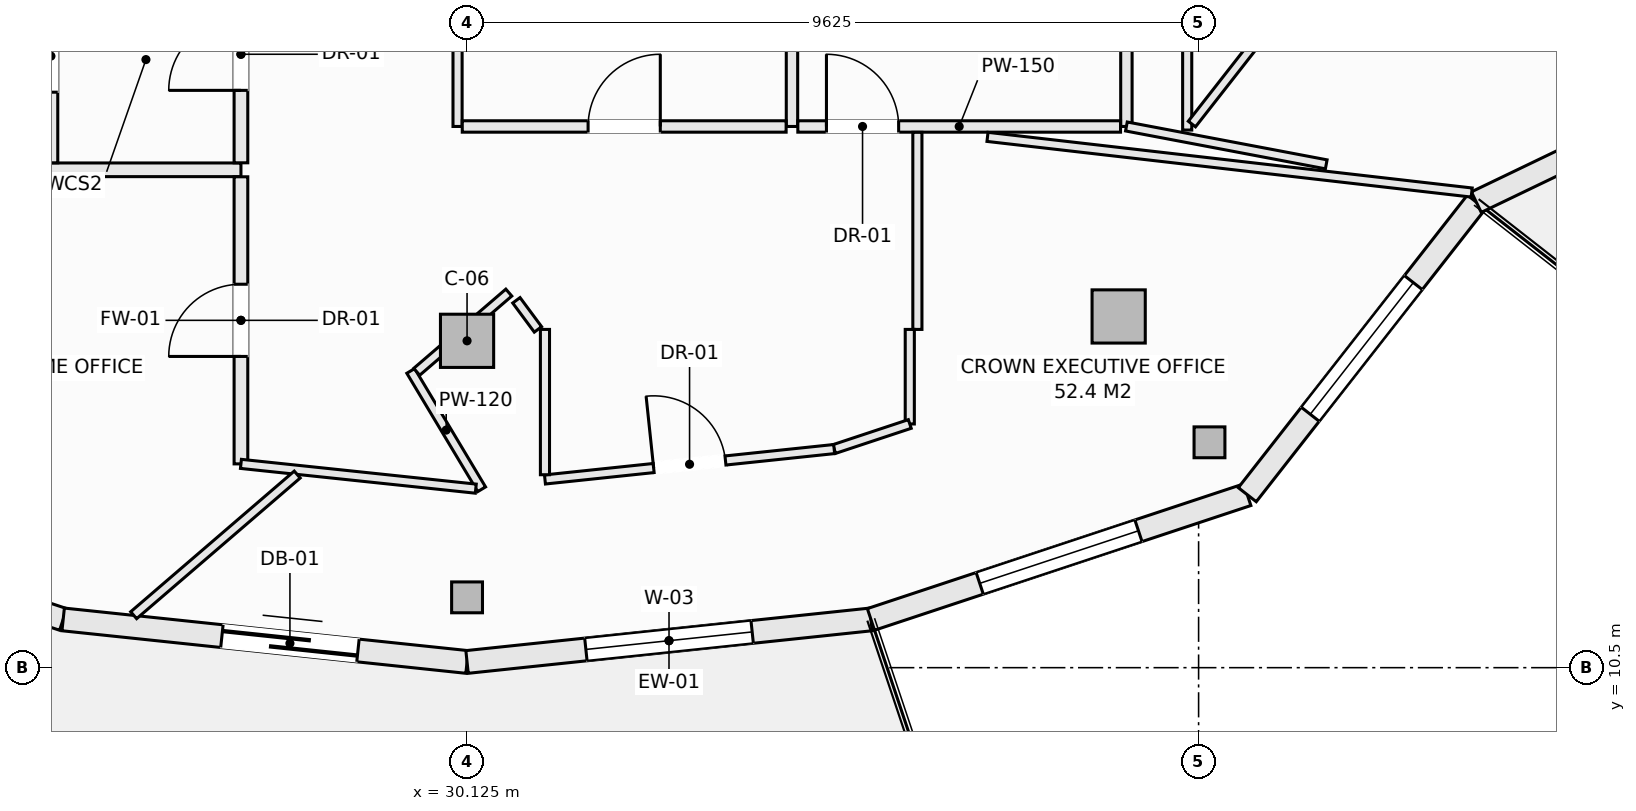
"""IFC4 building model, lengths in metres.
Left out: names, types, materials, properties, quantities, classifications, styles, units other than length and angle.
Written with IfcOpenShell. Run it as: python <this file> out.ifc"""

import sys

from ifc_helpers import new_model, si_unit, direction, frame, frame_2d, origin, origin_2d, place, context, subcontext, project, spatial, rectangle, hollow_rectangle, extrude, element, fill, save


model = new_model("IFC4")
c1 = context("Model", 3, precision=1e-05, world=origin(), true_north=direction((0.0, 1.0)))
c2 = subcontext(c1, "Body", "Model", "MODEL_VIEW")
j1 = project(units=[si_unit("LENGTHUNIT", "METRE"), si_unit("PLANEANGLEUNIT", "RADIAN")], contexts=[c1])
p1 = place(None, origin())
s1 = spatial("IfcSite", under=j1, at=p1, CompositionType="ELEMENT")
p2 = place(p1, origin())
s2 = spatial("IfcBuilding", under=s1, at=p2, CompositionType="ELEMENT")
p3 = place(p2, frame((0.0, 0.0, 262.4)))
s3 = spatial("IfcBuildingStorey", under=s2, at=p3, CompositionType="ELEMENT", Elevation=262.4)
for number, where, z_axis, x_axis in (
    (1, (30.125, 11.425, -0.27), (0.0, 0.0, 1.0), (1.0, 0.0, 0.0)),
    (2, (39.893, 13.465, -0.27), (0.0, 0.0, 1.0), (1.0, 0.0, 0.0)),
):
    element("IfcColumn", number, at=place(p3, frame(where, z_axis=z_axis, x_axis=x_axis)), inside=s3, PredefinedType="COLUMN", context=c2, shape_type="SweptSolid", body=[
        extrude(hollow_rectangle(XDim=0.406, YDim=0.406, WallThickness=0.016, at=origin_2d()), origin(), (0.0, 0.0, 1.0), 3.3),
    ])
for number, where, z_axis, x_axis in (
    (3, (30.125, 14.8, -0.27), (0.0, 0.0, 1.0), (1.0, 0.0, 0.0)),
    (4, (38.698, 15.121, -0.27), (0.0, 0.0, 1.0), (1.0, 0.0, 0.0)),
):
    element("IfcColumn", number, at=place(p3, frame(where, z_axis=z_axis, x_axis=x_axis)), inside=s3, PredefinedType="COLUMN", context=c2, shape_type="SweptSolid", body=[
        extrude(rectangle(XDim=0.7, YDim=0.7, at=origin_2d()), origin(), (0.0, 0.0, 1.0), 3.3),
    ])
p4 = place(p3, frame((19.859, 12.775, 0.0), z_axis=(0.0, 0.0, 1.0), x_axis=(0.949252744709, -0.314514271001, 0.0)))
e5 = element("IfcWall", 5, at=p4, inside=s3, PredefinedType="SOLIDWALL", context=c2, shape_type="SweptSolid", body=[
    extrude(rectangle(XDim=5.216, YDim=0.3, at=frame_2d((2.608, 0.0))), origin(), (0.0, 0.0, 1.0), 2.605),
])
p5 = place(p4, frame((1.508, 0.0, 0.72)))
e6 = element("IfcOpeningElement", 6, at=p5, cuts=e5, PredefinedType="OPENING", context=c2, shape_type="SweptSolid", body=[
    extrude(rectangle(XDim=2.2, YDim=1.65, at=frame_2d((1.1, 0.825))), frame((0.0, 0.16, 0.0), z_axis=(0.0, -1.0, 0.0), x_axis=(1.0, 0.0, 0.0)), (0.0, 0.0, 1.0), 0.32),
])
p6 = place(p3, frame((24.811, 11.135, 0.0), z_axis=(0.0, 0.0, 1.0), x_axis=(0.9944966869, -0.104768028258, 0.0)))
e7 = element("IfcWall", 7, at=p6, inside=s3, PredefinedType="SOLIDWALL", context=c2, shape_type="SweptSolid", body=[
    extrude(rectangle(XDim=5.343, YDim=0.3, at=frame_2d((2.672, 0.0))), origin(), (0.0, 0.0, 1.0), 2.605),
])
p7 = place(p6, frame((2.1, 0.0, 0.0)))
e8 = element("IfcOpeningElement", 8, at=p7, cuts=e7, PredefinedType="OPENING", context=c2, shape_type="SweptSolid", body=[
    extrude(rectangle(XDim=1.8, YDim=2.25, at=frame_2d((0.9, 1.125))), frame((0.0, 0.16, 0.0), z_axis=(0.0, -1.0, 0.0), x_axis=(1.0, 0.0, 0.0)), (0.0, 0.0, 1.0), 0.32),
])
p8 = place(p3, frame((30.125, 10.575, 0.0), z_axis=(0.0, 0.0, 1.0), x_axis=(0.9944966869, 0.104768028258, 0.0)))
e9 = element("IfcWall", 9, at=p8, inside=s3, PredefinedType="SOLIDWALL", context=c2, shape_type="SweptSolid", body=[
    extrude(rectangle(XDim=5.343, YDim=0.3, at=frame_2d((2.672, 0.0))), origin(), (0.0, 0.0, 1.0), 2.605),
])
p9 = place(p8, frame((1.572, 0.0, 0.72)))
e10 = element("IfcOpeningElement", 10, at=p9, cuts=e9, PredefinedType="OPENING", context=c2, shape_type="SweptSolid", body=[
    extrude(rectangle(XDim=2.2, YDim=1.65, at=frame_2d((1.1, 0.825))), frame((0.0, 0.16, 0.0), z_axis=(0.0, -1.0, 0.0), x_axis=(1.0, 0.0, 0.0)), (0.0, 0.0, 1.0), 0.32),
])
p10 = place(p3, frame((35.439, 11.135, 0.0), z_axis=(0.0, 0.0, 1.0), x_axis=(0.949252744709, 0.314514271001, 0.0)))
e11 = element("IfcWall", 11, at=p10, inside=s3, PredefinedType="SOLIDWALL", context=c2, shape_type="SweptSolid", body=[
    extrude(rectangle(XDim=5.216, YDim=0.3, at=frame_2d((2.608, 0.0))), origin(), (0.0, 0.0, 1.0), 2.605),
])
p11 = place(p10, frame((1.508, 0.0, 0.72)))
e12 = element("IfcOpeningElement", 12, at=p11, cuts=e11, PredefinedType="OPENING", context=c2, shape_type="SweptSolid", body=[
    extrude(rectangle(XDim=2.2, YDim=1.65, at=frame_2d((1.1, 0.825))), frame((0.0, 0.16, 0.0), z_axis=(0.0, -1.0, 0.0), x_axis=(1.0, 0.0, 0.0)), (0.0, 0.0, 1.0), 0.32),
])
p12 = place(p3, frame((40.391, 12.775, 0.0), z_axis=(0.0, 0.0, 1.0), x_axis=(0.616413297421, 0.78742278781, 0.0)))
e13 = element("IfcWall", 13, at=p12, inside=s3, PredefinedType="SOLIDWALL", context=c2, shape_type="SweptSolid", body=[
    extrude(rectangle(XDim=4.888, YDim=0.3, at=frame_2d((2.444, 0.0))), origin(), (0.0, 0.0, 1.0), 2.605),
])
p13 = place(p12, frame((1.344, 0.0, 0.72)))
e14 = element("IfcOpeningElement", 14, at=p13, cuts=e13, PredefinedType="OPENING", context=c2, shape_type="SweptSolid", body=[
    extrude(rectangle(XDim=2.2, YDim=1.65, at=frame_2d((1.1, 0.825))), frame((0.0, 0.16, 0.0), z_axis=(0.0, -1.0, 0.0), x_axis=(1.0, 0.0, 0.0)), (0.0, 0.0, 1.0), 0.32),
])
p14 = place(p3, frame((43.404, 16.625, 0.0), z_axis=(0.0, 0.0, 1.0), x_axis=(0.901346013132, 0.433099716706, 0.0)))
e15 = element("IfcWall", 15, at=p14, inside=s3, PredefinedType="SOLIDWALL", context=c2, shape_type="SweptSolid", body=[
    extrude(rectangle(XDim=4.994, YDim=0.3, at=frame_2d((2.497, 0.0))), origin(), (0.0, 0.0, 1.0), 2.605),
])
p15 = place(p14, frame((1.397, 0.0, 0.72)))
e16 = element("IfcOpeningElement", 16, at=p15, cuts=e15, PredefinedType="OPENING", context=c2, shape_type="SweptSolid", body=[
    extrude(rectangle(XDim=2.2, YDim=1.65, at=frame_2d((1.1, 0.825))), frame((0.0, 0.16, 0.0), z_axis=(0.0, -1.0, 0.0), x_axis=(1.0, 0.0, 0.0)), (0.0, 0.0, 1.0), 0.32),
])
p16 = place(p3, frame((22.15, 17.05, 0.0), z_axis=(0.0, 0.0, 1.0), x_axis=(1.0, 0.0, 0.0)))
e17 = element("IfcWall", 17, at=p16, inside=s3, PredefinedType="SOLIDWALL", context=c2, shape_type="SweptSolid", body=[
    extrude(rectangle(XDim=5.0, YDim=0.18, at=frame_2d((2.5, 0.0))), origin(), (0.0, 0.0, 1.0), 3.03),
])
p17 = place(p3, frame((24.65, 17.142, 0.0), z_axis=(0.0, 0.0, 1.0), x_axis=(0.0, 1.0, 0.0)))
e18 = element("IfcWall", 18, at=p17, inside=s3, PredefinedType="SOLIDWALL", context=c2, shape_type="SweptSolid", body=[
    extrude(rectangle(XDim=2.808, YDim=0.18, at=frame_2d((1.404, 0.0))), origin(), (0.0, 0.0, 1.0), 3.03),
])
p18 = place(p17, frame((0.929, 0.0, 0.0)))
e19 = element("IfcOpeningElement", 19, at=p18, cuts=e18, PredefinedType="OPENING", context=c2, shape_type="SweptSolid", body=[
    extrude(rectangle(XDim=0.95, YDim=2.1, at=frame_2d((0.475, 1.05))), frame((0.0, 0.1, 0.0), z_axis=(0.0, -1.0, 0.0), x_axis=(1.0, 0.0, 0.0)), (0.0, 0.0, 1.0), 0.2),
])
p19 = place(p3, frame((27.15, 13.181, 0.0), z_axis=(0.0, 0.0, 1.0), x_axis=(0.0, 1.0, 0.0)))
e20 = element("IfcWall", 20, at=p19, inside=s3, PredefinedType="SOLIDWALL", context=c2, shape_type="SweptSolid", body=[
    extrude(rectangle(XDim=3.777, YDim=0.18, at=frame_2d((1.889, 0.0))), origin(), (0.0, 0.0, 1.0), 3.03),
])
p20 = place(p19, frame((1.414, 0.0, 0.0)))
e21 = element("IfcOpeningElement", 21, at=p20, cuts=e20, PredefinedType="OPENING", context=c2, shape_type="SweptSolid", body=[
    extrude(rectangle(XDim=0.95, YDim=2.1, at=frame_2d((0.475, 1.05))), frame((0.0, 0.1, 0.0), z_axis=(0.0, -1.0, 0.0), x_axis=(1.0, 0.0, 0.0)), (0.0, 0.0, 1.0), 0.2),
])
p21 = place(p3, frame((27.15, 17.142, 0.0), z_axis=(0.0, 0.0, 1.0), x_axis=(0.0, 1.0, 0.0)))
e22 = element("IfcWall", 22, at=p21, inside=s3, PredefinedType="SOLIDWALL", context=c2, shape_type="SweptSolid", body=[
    extrude(rectangle(XDim=2.856, YDim=0.18, at=frame_2d((1.428, 0.0))), origin(), (0.0, 0.0, 1.0), 3.03),
])
p22 = place(p21, frame((0.953, 0.0, 0.0)))
e23 = element("IfcOpeningElement", 23, at=p22, cuts=e22, PredefinedType="OPENING", context=c2, shape_type="SweptSolid", body=[
    extrude(rectangle(XDim=0.95, YDim=2.1, at=frame_2d((0.475, 1.05))), frame((0.0, 0.1, 0.0), z_axis=(0.0, -1.0, 0.0), x_axis=(1.0, 0.0, 0.0)), (0.0, 0.0, 1.0), 0.2),
])
p23 = place(p3, frame((30.0, 17.62, 0.0), z_axis=(0.0, 0.0, 1.0), x_axis=(0.0, 1.0, 0.0)))
e24 = element("IfcWall", 24, at=p23, inside=s3, PredefinedType="PARTITIONING", context=c2, shape_type="SweptSolid", body=[
    extrude(rectangle(XDim=2.18, YDim=0.12, at=frame_2d((1.09, 0.0))), origin(), (0.0, 0.0, 1.0), 3.03),
])
for number, where, z_axis, x_axis in (
    (25, (38.8, 17.62, 0.0), (0.0, 0.0, 1.0), (0.0, 1.0, 0.0)),
    (26, (34.4, 17.62, 0.0), (0.0, 0.0, 1.0), (0.0, 1.0, 0.0)),
):
    element("IfcWall", number, at=place(p3, frame(where, z_axis=z_axis, x_axis=x_axis)), inside=s3, PredefinedType="PARTITIONING", context=c2, shape_type="SweptSolid", body=[
        extrude(rectangle(XDim=2.18, YDim=0.15, at=frame_2d((1.09, 0.0))), origin(), (0.0, 0.0, 1.0), 3.03),
    ])
p24 = place(p3, frame((30.062, 17.62, 0.0), z_axis=(0.0, 0.0, 1.0), x_axis=(1.0, 0.0, 0.0)))
e27 = element("IfcWall", 27, at=p24, inside=s3, PredefinedType="PARTITIONING", context=c2, shape_type="SweptSolid", body=[
    extrude(rectangle(XDim=4.261, YDim=0.15, at=frame_2d((2.13, 0.0))), origin(), (0.0, 0.0, 1.0), 3.03),
])
p25 = place(p24, frame((1.656, 0.0, 0.0)))
e28 = element("IfcOpeningElement", 28, at=p25, cuts=e27, PredefinedType="OPENING", context=c2, shape_type="SweptSolid", body=[
    extrude(rectangle(XDim=0.95, YDim=2.1, at=frame_2d((0.475, 1.05))), frame((0.0, 0.085, 0.0), z_axis=(0.0, -1.0, 0.0), x_axis=(1.0, 0.0, 0.0)), (0.0, 0.0, 1.0), 0.17),
])
p26 = place(p3, frame((34.477, 17.62, 0.0), z_axis=(0.0, 0.0, 1.0), x_axis=(1.0, 0.0, 0.0)))
e29 = element("IfcWall", 29, at=p26, inside=s3, PredefinedType="PARTITIONING", context=c2, shape_type="SweptSolid", body=[
    extrude(rectangle(XDim=4.246, YDim=0.15, at=frame_2d((2.123, 0.0))), origin(), (0.0, 0.0, 1.0), 3.03),
])
p27 = place(p26, frame((0.376, 0.0, 0.0)))
e30 = element("IfcOpeningElement", 30, at=p27, cuts=e29, PredefinedType="OPENING", context=c2, shape_type="SweptSolid", body=[
    extrude(rectangle(XDim=0.95, YDim=2.1, at=frame_2d((0.475, 1.05))), frame((0.0, 0.085, 0.0), z_axis=(0.0, -1.0, 0.0), x_axis=(1.0, 0.0, 0.0)), (0.0, 0.0, 1.0), 0.17),
])
p28 = place(p3, frame((39.6, 17.573, 0.0), z_axis=(0.0, 0.0, 1.0), x_axis=(0.0, 1.0, 0.0)))
e31 = element("IfcWall", 31, at=p28, inside=s3, PredefinedType="PARTITIONING", context=c2, shape_type="SweptSolid", body=[
    extrude(rectangle(XDim=5.447, YDim=0.12, at=frame_2d((2.724, 0.0))), origin(), (0.0, 0.0, 1.0), 2.478),
])
p29 = place(p3, frame((39.662, 17.652, 0.0), z_axis=(0.0, 0.0, 1.0), x_axis=(0.616212345115, 0.78758005671, 0.0)))
e32 = element("IfcWall", 32, at=p29, inside=s3, PredefinedType="PARTITIONING", context=c2, shape_type="SweptSolid", body=[
    extrude(rectangle(XDim=2.333, YDim=0.12, at=frame_2d((1.167, 0.0))), origin(), (0.0, 0.0, 1.0), 2.478),
])
p30 = place(p3, frame((36.05, 14.95, 0.0), z_axis=(0.0, 0.0, 1.0), x_axis=(0.0, 1.0, 0.0)))
e33 = element("IfcWall", 33, at=p30, inside=s3, PredefinedType="PARTITIONING", context=c2, shape_type="SweptSolid", body=[
    extrude(rectangle(XDim=2.593, YDim=0.12, at=frame_2d((1.296, 0.0))), origin(), (0.0, 0.0, 1.0), 3.03),
])
p31 = place(p3, frame((35.95, 13.706, 0.0), z_axis=(0.0, 0.0, 1.0), x_axis=(0.0, 1.0, 0.0)))
e34 = element("IfcWall", 34, at=p31, inside=s3, PredefinedType="PARTITIONING", context=c2, shape_type="SweptSolid", body=[
    extrude(rectangle(XDim=1.244, YDim=0.12, at=frame_2d((0.622, 0.0))), origin(), (0.0, 0.0, 1.0), 3.03),
])
p32 = place(p3, frame((34.955, 13.376, 0.0), z_axis=(0.0, 0.0, 1.0), x_axis=(0.949124905871, 0.314899846071, 0.0)))
e35 = element("IfcWall", 35, at=p32, inside=s3, PredefinedType="PARTITIONING", context=c2, shape_type="SweptSolid", body=[
    extrude(rectangle(XDim=1.048, YDim=0.12, at=frame_2d((0.524, 0.0))), origin(), (0.0, 0.0, 1.0), 3.03),
])
p33 = place(p3, frame((31.15, 12.976, 0.0), z_axis=(0.0, 0.0, 1.0), x_axis=(0.994522920899, 0.104518705533, 0.0)))
e36 = element("IfcWall", 36, at=p33, inside=s3, PredefinedType="PARTITIONING", context=c2, shape_type="SweptSolid", body=[
    extrude(rectangle(XDim=3.826, YDim=0.12, at=frame_2d((1.913, 0.0))), origin(), (0.0, 0.0, 1.0), 3.03),
])
p34 = place(p33, frame((1.438, 0.0, 0.0)))
e37 = element("IfcOpeningElement", 37, at=p34, cuts=e36, PredefinedType="OPENING", context=c2, shape_type="SweptSolid", body=[
    extrude(rectangle(XDim=0.95, YDim=2.1, at=frame_2d((0.475, 1.05))), frame((0.0, 0.07, 0.0), z_axis=(0.0, -1.0, 0.0), x_axis=(1.0, 0.0, 0.0)), (0.0, 0.0, 1.0), 0.14),
])
p35 = place(p3, frame((31.15, 13.038, 0.0), z_axis=(0.0, 0.0, 1.0), x_axis=(0.0, 1.0, 0.0)))
e38 = element("IfcWall", 38, at=p35, inside=s3, PredefinedType="PARTITIONING", context=c2, shape_type="SweptSolid", body=[
    extrude(rectangle(XDim=1.912, YDim=0.12, at=frame_2d((0.956, 0.0))), origin(), (0.0, 0.0, 1.0), 3.03),
])
p36 = place(p3, frame((30.774, 15.333, 0.0), z_axis=(0.0, 0.0, 1.0), x_axis=(0.595814974861, -0.803121731577, 0.0)))
e39 = element("IfcWall", 39, at=p36, inside=s3, PredefinedType="PARTITIONING", context=c2, shape_type="SweptSolid", body=[
    extrude(rectangle(XDim=0.477, YDim=0.12, at=frame_2d((0.239, 0.0))), origin(), (0.0, 0.0, 1.0), 3.03),
])
p37 = place(p3, frame((29.384, 14.404, 0.0), z_axis=(0.0, 0.0, 1.0), x_axis=(0.513922040123, -0.857836893982, 0.0)))
e40 = element("IfcWall", 40, at=p37, inside=s3, PredefinedType="PARTITIONING", context=c2, shape_type="SweptSolid", body=[
    extrude(rectangle(XDim=1.815, YDim=0.12, at=frame_2d((0.908, 0.0))), origin(), (0.0, 0.0, 1.0), 2.77),
])
p38 = place(p3, frame((27.15, 13.181, 0.0), z_axis=(0.0, 0.0, 1.0), x_axis=(0.994482609393, -0.104901571076, 0.0)))
e41 = element("IfcWall", 41, at=p38, inside=s3, PredefinedType="PARTITIONING", context=c2, shape_type="SweptSolid", body=[
    extrude(rectangle(XDim=3.107, YDim=0.12, at=frame_2d((1.553, 0.0))), origin(), (0.0, 0.0, 1.0), 3.03),
])
p39 = place(p3, frame((25.739, 11.19, 0.0), z_axis=(0.0, 0.0, 1.0), x_axis=(0.75818689734, 0.652037290883, 0.0)))
e42 = element("IfcWall", 42, at=p39, inside=s3, PredefinedType="PARTITIONING", context=c2, shape_type="SweptSolid", body=[
    extrude(rectangle(XDim=2.838, YDim=0.12, at=frame_2d((1.419, 0.0))), origin(), (0.0, 0.0, 1.0), 3.03),
])
p40 = place(p3, frame((29.463, 14.393, 0.0), z_axis=(0.0, 0.0, 1.0), x_axis=(0.758209368839, 0.652011160184, 0.0)))
e43 = element("IfcWall", 43, at=p40, inside=s3, PredefinedType="PARTITIONING", context=c2, shape_type="SweptSolid", body=[
    extrude(rectangle(XDim=1.598, YDim=0.12, at=frame_2d((0.799, 0.0))), origin(), (0.0, 0.0, 1.0), 3.03),
])
p41 = place(p3, frame((36.972, 17.483, 0.0), z_axis=(0.0, 0.0, 1.0), x_axis=(0.993465006101, -0.114137117773, 0.0)))
e44 = element("IfcWall", 44, at=p41, inside=s3, PredefinedType="PARTITIONING", context=c2, shape_type="SweptSolid", body=[
    extrude(rectangle(XDim=6.413, YDim=0.12, at=frame_2d((3.207, 0.0))), origin(), (0.0, 0.0, 1.0), 2.77),
])
p42 = place(p3, frame((38.8, 17.62, 0.0), z_axis=(0.0, 0.0, 1.0), x_axis=(0.982513005499, -0.186193968823, 0.0)))
e45 = element("IfcWall", 45, at=p42, inside=s3, PredefinedType="PARTITIONING", context=c2, shape_type="SweptSolid", body=[
    extrude(rectangle(XDim=2.676, YDim=0.12, at=frame_2d((1.338, 0.0))), origin(), (0.0, 0.0, 1.0), 3.03),
])
p43 = place(p7, frame((1.8, 0.0, 0.0), z_axis=(0.0, 0.0, 1.0), x_axis=(-1.0, 0.0, 0.0)))
e46 = element("IfcDoor", 46, at=p43, inside=s3, OperationType="SLIDING_TO_LEFT", PredefinedType="DOOR", context=c2, shape_type="SweptSolid", body=[
    extrude(rectangle(XDim=1.8, YDim=2.25, at=frame_2d((0.9, 1.125))), frame((0.0, 0.025, 0.0), z_axis=(0.0, -1.0, 0.0), x_axis=(1.0, 0.0, 0.0)), (0.0, 0.0, 1.0), 0.05),
])
fill(e8, e46)
p44 = place(p9, origin())
e47 = element("IfcWindow", 47, at=p44, inside=s3, PartitioningType="SINGLE_PANEL", PredefinedType="WINDOW", context=c2, shape_type="SweptSolid", body=[
    extrude(rectangle(XDim=2.2, YDim=1.65, at=frame_2d((1.1, 0.825))), frame((0.0, 0.03, 0.0), z_axis=(0.0, -1.0, 0.0), x_axis=(1.0, 0.0, 0.0)), (0.0, 0.0, 1.0), 0.06),
])
fill(e10, e47)
p45 = place(p11, origin())
e48 = element("IfcWindow", 48, at=p45, inside=s3, PartitioningType="SINGLE_PANEL", PredefinedType="WINDOW", context=c2, shape_type="SweptSolid", body=[
    extrude(rectangle(XDim=2.2, YDim=1.65, at=frame_2d((1.1, 0.825))), frame((0.0, 0.03, 0.0), z_axis=(0.0, -1.0, 0.0), x_axis=(1.0, 0.0, 0.0)), (0.0, 0.0, 1.0), 0.06),
])
fill(e12, e48)
p46 = place(p13, origin())
e49 = element("IfcWindow", 49, at=p46, inside=s3, PartitioningType="SINGLE_PANEL", PredefinedType="WINDOW", context=c2, shape_type="SweptSolid", body=[
    extrude(rectangle(XDim=2.2, YDim=1.65, at=frame_2d((1.1, 0.825))), frame((0.0, 0.03, 0.0), z_axis=(0.0, -1.0, 0.0), x_axis=(1.0, 0.0, 0.0)), (0.0, 0.0, 1.0), 0.06),
])
fill(e14, e49)
p47 = place(p22, origin())
e50 = element("IfcDoor", 50, at=p47, inside=s3, OperationType="SINGLE_SWING_LEFT", PredefinedType="DOOR", context=c2, shape_type="SweptSolid", body=[
    extrude(rectangle(XDim=0.95, YDim=2.1, at=frame_2d((0.475, 1.05))), frame((0.0, 0.025, 0.0), z_axis=(0.0, -1.0, 0.0), x_axis=(1.0, 0.0, 0.0)), (0.0, 0.0, 1.0), 0.05),
])
fill(e23, e50)
p48 = place(p25, origin())
e51 = element("IfcDoor", 51, at=p48, inside=s3, OperationType="SINGLE_SWING_RIGHT", PredefinedType="DOOR", context=c2, shape_type="SweptSolid", body=[
    extrude(rectangle(XDim=0.95, YDim=2.1, at=frame_2d((0.475, 1.05))), frame((0.0, 0.025, 0.0), z_axis=(0.0, -1.0, 0.0), x_axis=(1.0, 0.0, 0.0)), (0.0, 0.0, 1.0), 0.05),
])
fill(e28, e51)
p49 = place(p27, origin())
e52 = element("IfcDoor", 52, at=p49, inside=s3, OperationType="SINGLE_SWING_LEFT", PredefinedType="DOOR", context=c2, shape_type="SweptSolid", body=[
    extrude(rectangle(XDim=0.95, YDim=2.1, at=frame_2d((0.475, 1.05))), frame((0.0, 0.025, 0.0), z_axis=(0.0, -1.0, 0.0), x_axis=(1.0, 0.0, 0.0)), (0.0, 0.0, 1.0), 0.05),
])
fill(e30, e52)
p50 = place(p34, origin())
e53 = element("IfcDoor", 53, at=p50, inside=s3, OperationType="SINGLE_SWING_LEFT", PredefinedType="DOOR", context=c2, shape_type="SweptSolid", body=[
    extrude(rectangle(XDim=0.95, YDim=2.1, at=frame_2d((0.475, 1.05))), frame((0.0, 0.025, 0.0), z_axis=(0.0, -1.0, 0.0), x_axis=(1.0, 0.0, 0.0)), (0.0, 0.0, 1.0), 0.05),
])
fill(e37, e53)
p51 = place(p20, origin())
e54 = element("IfcDoor", 54, at=p51, inside=s3, OperationType="SINGLE_SWING_LEFT", PredefinedType="DOOR", context=c2, shape_type="SweptSolid", body=[
    extrude(rectangle(XDim=0.95, YDim=2.1, at=frame_2d((0.475, 1.05))), frame((0.0, 0.025, 0.0), z_axis=(0.0, -1.0, 0.0), x_axis=(1.0, 0.0, 0.0)), (0.0, 0.0, 1.0), 0.05),
])
fill(e21, e54)
p52 = place(p18, origin())
e55 = element("IfcDoor", 55, at=p52, inside=s3, OperationType="SINGLE_SWING_RIGHT", PredefinedType="DOOR", context=c2, shape_type="SweptSolid", body=[
    extrude(rectangle(XDim=0.95, YDim=2.1, at=frame_2d((0.475, 1.05))), frame((0.0, 0.025, 0.0), z_axis=(0.0, -1.0, 0.0), x_axis=(1.0, 0.0, 0.0)), (0.0, 0.0, 1.0), 0.05),
])
fill(e19, e55)
save(model, sys.argv[1])
